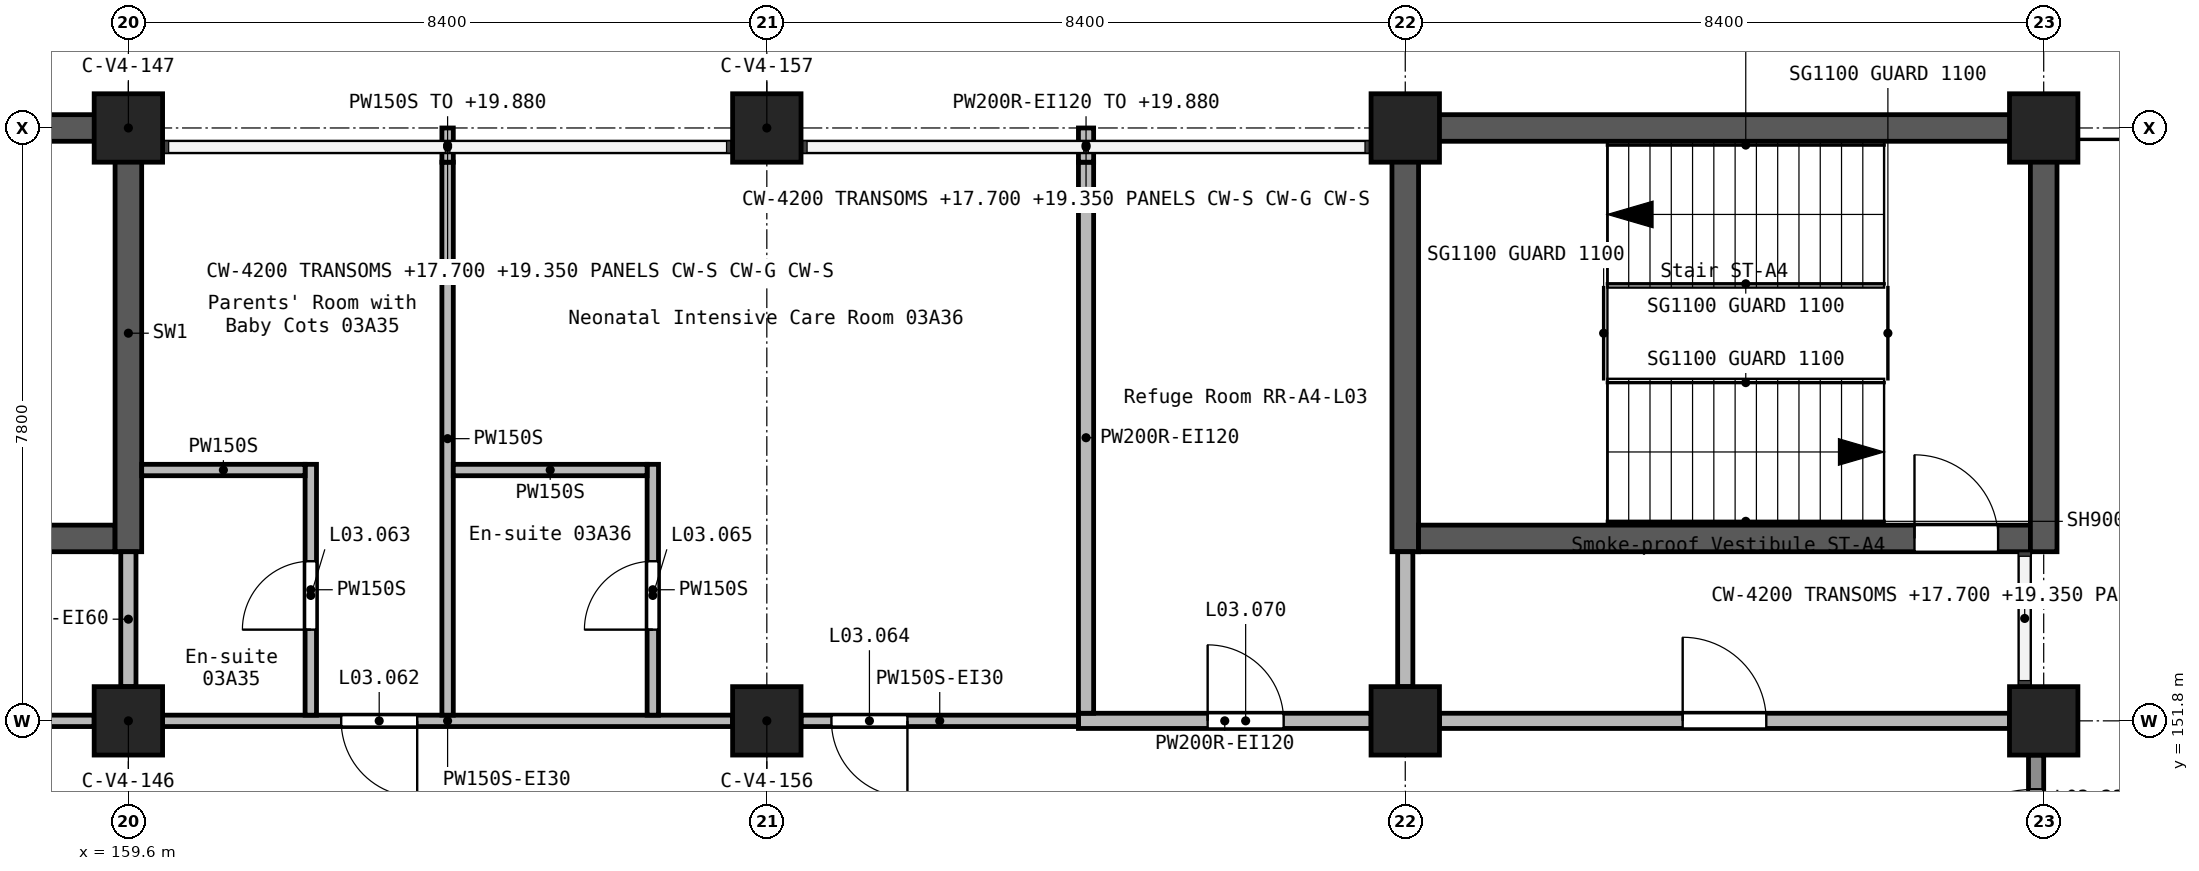
"""IFC4 building model, lengths in metres.
Left out: names, types, materials, properties, quantities, classifications, styles, units other than length and angle.
Written with IfcOpenShell. Run it as: python <this file> out.ifc"""

import sys

from ifc_helpers import new_model, si_unit, direction, frame, frame_2d, origin, origin_2d, place, context, subcontext, project, spatial, rectangle, extrude, element, fill, save


model = new_model("IFC4")
c1 = context("Model", 3, precision=1e-05, world=origin(), true_north=direction((0.0, 1.0)))
c2 = subcontext(c1, "Body", "Model", "MODEL_VIEW")
j1 = project(units=[si_unit("LENGTHUNIT", "METRE"), si_unit("PLANEANGLEUNIT", "RADIAN")], contexts=[c1])
p1 = place(None, origin())
s1 = spatial("IfcSite", under=j1, at=p1, CompositionType="ELEMENT")
p2 = place(p1, origin())
s2 = spatial("IfcBuilding", under=s1, at=p2, CompositionType="ELEMENT")
p3 = place(p2, frame((0.0, 0.0, 16.8)))
s3 = spatial("IfcBuildingStorey", under=s2, at=p3, CompositionType="ELEMENT", Elevation=16.8)
for number, where, z_axis, x_axis in (
    (1, (159.6, 151.8, 0.0), (0.0, 0.0, 1.0), (1.0, 0.0, 0.0)),
    (2, (159.6, 159.6, 0.0), (0.0, 0.0, 1.0), (1.0, 0.0, 0.0)),
    (3, (168.0, 151.8, 0.0), (0.0, 0.0, 1.0), (1.0, 0.0, 0.0)),
    (4, (168.0, 159.6, 0.0), (0.0, 0.0, 1.0), (1.0, 0.0, 0.0)),
    (5, (176.4, 151.8, 0.0), (0.0, 0.0, 1.0), (1.0, 0.0, 0.0)),
    (6, (176.4, 159.6, 0.0), (0.0, 0.0, 1.0), (1.0, 0.0, 0.0)),
    (7, (184.8, 151.8, 0.0), (0.0, 0.0, 1.0), (1.0, 0.0, 0.0)),
    (8, (184.8, 159.6, 0.0), (0.0, 0.0, 1.0), (1.0, 0.0, 0.0)),
):
    element("IfcColumn", number, at=place(p3, frame(where, z_axis=z_axis, x_axis=x_axis)), inside=s3, PredefinedType="COLUMN", context=c2, shape_type="SweptSolid", body=[
        extrude(rectangle(XDim=0.9, YDim=0.9, at=origin_2d()), origin(), (0.0, 0.0, 1.0), 4.2),
    ])
p4 = place(p3, frame((176.225, 159.6, 0.0), z_axis=(0.0, 0.0, 1.0), x_axis=(1.0, 0.0, 0.0)))
e9 = element("IfcWall", 9, at=p4, inside=s3, PredefinedType="SHEAR", context=c2, shape_type="SweptSolid", body=[
    extrude(rectangle(XDim=8.4, YDim=0.35, at=frame_2d((4.2, 0.0))), origin(), (0.0, 0.0, 1.0), 4.2),
])
p5 = place(p3, frame((176.4, 154.025, 0.0), z_axis=(0.0, 0.0, 1.0), x_axis=(0.0, 1.0, 0.0)))
e10 = element("IfcWall", 10, at=p5, inside=s3, PredefinedType="SHEAR", context=c2, shape_type="SweptSolid", body=[
    extrude(rectangle(XDim=5.4, YDim=0.35, at=frame_2d((2.7, 0.0))), origin(), (0.0, 0.0, 1.0), 4.2),
])
p6 = place(p3, frame((176.575, 154.2, 0.0), z_axis=(0.0, 0.0, 1.0), x_axis=(1.0, 0.0, 0.0)))
e11 = element("IfcWall", 11, at=p6, inside=s3, PredefinedType="SHEAR", context=c2, shape_type="SweptSolid", body=[
    extrude(rectangle(XDim=8.05, YDim=0.35, at=frame_2d((4.025, 0.0))), origin(), (0.0, 0.0, 1.0), 4.2),
])
p7 = place(p6, frame((6.525, 0.0, 0.0)))
e12 = element("IfcOpeningElement", 12, at=p7, cuts=e11, PredefinedType="OPENING", context=c2, shape_type="SweptSolid", body=[
    extrude(rectangle(XDim=1.1, YDim=2.1, at=frame_2d((0.55, 1.05))), frame((0.0, 0.185, 0.0), z_axis=(0.0, -1.0, 0.0), x_axis=(1.0, 0.0, 0.0)), (0.0, 0.0, 1.0), 0.37),
])
p8 = place(p3, frame((184.8, 154.025, 0.0), z_axis=(0.0, 0.0, 1.0), x_axis=(0.0, 1.0, 0.0)))
e13 = element("IfcWall", 13, at=p8, inside=s3, PredefinedType="SHEAR", context=c2, shape_type="SweptSolid", body=[
    extrude(rectangle(XDim=5.75, YDim=0.35, at=frame_2d((2.875, 0.0))), origin(), (0.0, 0.0, 1.0), 4.2),
])
for number, where, z_axis, x_axis in (
    (14, (155.4, 154.2, 0.0), (0.0, 0.0, 1.0), (1.0, 0.0, 0.0)),
    (15, (155.4, 159.6, 0.0), (0.0, 0.0, 1.0), (1.0, 0.0, 0.0)),
):
    element("IfcWall", number, at=place(p3, frame(where, z_axis=z_axis, x_axis=x_axis)), inside=s3, PredefinedType="SHEAR", context=c2, shape_type="SweptSolid", body=[
        extrude(rectangle(XDim=4.025, YDim=0.35, at=frame_2d((2.013, 0.0))), origin(), (0.0, 0.0, 1.0), 3.9),
    ])
p9 = place(p3, frame((159.6, 154.025, 0.0), z_axis=(0.0, 0.0, 1.0), x_axis=(0.0, 1.0, 0.0)))
e16 = element("IfcWall", 16, at=p9, inside=s3, PredefinedType="SHEAR", context=c2, shape_type="SweptSolid", body=[
    extrude(rectangle(XDim=5.75, YDim=0.35, at=frame_2d((2.875, 0.0))), origin(), (0.0, 0.0, 1.0), 3.9),
])
p10 = place(p3, frame((184.7, 148.65, 0.0), z_axis=(0.0, 0.0, 1.0), x_axis=(0.0, 1.0, 0.0)))
e17 = element("IfcWall", 17, at=p10, inside=s3, PredefinedType="STANDARD", context=c2, shape_type="SweptSolid", body=[
    extrude(rectangle(XDim=2.7, YDim=0.2, at=frame_2d((1.35, 0.0))), origin(), (0.0, 0.0, 1.0), 3.05),
])
p11 = place(p10, frame((0.45, 0.0, 0.0)))
e18 = element("IfcOpeningElement", 18, at=p11, cuts=e17, PredefinedType="OPENING", context=c2, shape_type="SweptSolid", body=[
    extrude(rectangle(XDim=1.8, YDim=2.4, at=frame_2d((0.9, 1.2))), frame((0.0, 0.11, 0.0), z_axis=(0.0, -1.0, 0.0), x_axis=(1.0, 0.0, 0.0)), (0.0, 0.0, 1.0), 0.22),
])
p12 = place(p3, frame((172.1, 151.8, 0.0), z_axis=(0.0, 0.0, 1.0), x_axis=(1.0, 0.0, 0.0)))
e19 = element("IfcWall", 19, at=p12, inside=s3, PredefinedType="SOLIDWALL", context=c2, shape_type="SweptSolid", body=[
    extrude(rectangle(XDim=3.85, YDim=0.2, at=frame_2d((1.925, 0.0))), origin(), (0.0, 0.0, 1.0), 3.9),
])
p13 = place(p12, frame((1.7, 0.0, 0.0)))
e20 = element("IfcOpeningElement", 20, at=p13, cuts=e19, PredefinedType="OPENING", context=c2, shape_type="SweptSolid", body=[
    extrude(rectangle(XDim=1.0, YDim=2.1, at=frame_2d((0.5, 1.05))), frame((0.0, 0.11, 0.0), z_axis=(0.0, -1.0, 0.0), x_axis=(1.0, 0.0, 0.0)), (0.0, 0.0, 1.0), 0.22),
])
p14 = place(p3, frame((176.85, 151.8, 0.0), z_axis=(0.0, 0.0, 1.0), x_axis=(1.0, 0.0, 0.0)))
e21 = element("IfcWall", 21, at=p14, inside=s3, PredefinedType="SOLIDWALL", context=c2, shape_type="SweptSolid", body=[
    extrude(rectangle(XDim=7.5, YDim=0.2, at=frame_2d((3.75, 0.0))), origin(), (0.0, 0.0, 1.0), 3.9),
])
p15 = place(p14, frame((3.2, 0.0, 0.0)))
e22 = element("IfcOpeningElement", 22, at=p15, cuts=e21, PredefinedType="OPENING", context=c2, shape_type="SweptSolid", body=[
    extrude(rectangle(XDim=1.1, YDim=2.1, at=frame_2d((0.55, 1.05))), frame((0.0, 0.11, 0.0), z_axis=(0.0, -1.0, 0.0), x_axis=(1.0, 0.0, 0.0)), (0.0, 0.0, 1.0), 0.22),
])
p16 = place(p3, frame((176.4, 152.25, 0.0), z_axis=(0.0, 0.0, 1.0), x_axis=(0.0, 1.0, 0.0)))
e23 = element("IfcWall", 23, at=p16, inside=s3, PredefinedType="SOLIDWALL", context=c2, shape_type="SweptSolid", body=[
    extrude(rectangle(XDim=1.775, YDim=0.2, at=frame_2d((0.887, 0.0))), origin(), (0.0, 0.0, 1.0), 3.9),
])
p17 = place(p3, frame((172.2, 151.9, 0.0), z_axis=(0.0, 0.0, 1.0), x_axis=(0.0, 1.0, 0.0)))
e24 = element("IfcWall", 24, at=p17, inside=s3, PredefinedType="SOLIDWALL", context=c2, shape_type="SweptSolid", body=[
    extrude(rectangle(XDim=7.25, YDim=0.2, at=frame_2d((3.625, 0.0))), origin(), (0.0, 0.0, 1.0), 3.9),
])
p18 = place(p3, frame((172.2, 159.15, 0.0), z_axis=(0.0, 0.0, 1.0), x_axis=(0.0, 1.0, 0.0)))
e25 = element("IfcWall", 25, at=p18, inside=s3, PredefinedType="SOLIDWALL", context=c2, shape_type="SweptSolid", body=[
    extrude(rectangle(XDim=0.45, YDim=0.2, at=frame_2d((0.225, 0.0))), origin(), (0.0, 0.0, 1.0), 3.08),
])
p19 = place(p3, frame((159.6, 152.25, 0.0), z_axis=(0.0, 0.0, 1.0), x_axis=(0.0, 1.0, 0.0)))
e26 = element("IfcWall", 26, at=p19, inside=s3, PredefinedType="SOLIDWALL", context=c2, shape_type="SweptSolid", body=[
    extrude(rectangle(XDim=1.775, YDim=0.2, at=frame_2d((0.887, 0.0))), origin(), (0.0, 0.0, 1.0), 3.9),
])
p20 = place(p3, frame((172.1, 151.8, 0.0), z_axis=(0.0, 0.0, 1.0), x_axis=(-1.0, 0.0, 0.0)))
e27 = element("IfcWall", 27, at=p20, inside=s3, PredefinedType="PARTITIONING", context=c2, shape_type="SweptSolid", body=[
    extrude(rectangle(XDim=3.65, YDim=0.15, at=frame_2d((1.825, 0.0))), origin(), (0.0, 0.0, 1.0), 3.9),
])
p21 = place(p20, frame((2.25, 0.0, 0.0)))
e28 = element("IfcOpeningElement", 28, at=p21, cuts=e27, PredefinedType="OPENING", context=c2, shape_type="SweptSolid", body=[
    extrude(rectangle(XDim=1.0, YDim=2.1, at=frame_2d((0.5, 1.05))), frame((0.0, 0.085, 0.0), z_axis=(0.0, -1.0, 0.0), x_axis=(1.0, 0.0, 0.0)), (0.0, 0.0, 1.0), 0.17),
])
p22 = place(p3, frame((167.55, 151.8, 0.0), z_axis=(0.0, 0.0, 1.0), x_axis=(-1.0, 0.0, 0.0)))
e29 = element("IfcWall", 29, at=p22, inside=s3, PredefinedType="PARTITIONING", context=c2, shape_type="SweptSolid", body=[
    extrude(rectangle(XDim=7.5, YDim=0.15, at=frame_2d((3.75, 0.0))), origin(), (0.0, 0.0, 1.0), 3.9),
])
p23 = place(p22, frame((4.15, 0.0, 0.0)))
e30 = element("IfcOpeningElement", 30, at=p23, cuts=e29, PredefinedType="OPENING", context=c2, shape_type="SweptSolid", body=[
    extrude(rectangle(XDim=1.0, YDim=2.1, at=frame_2d((0.5, 1.05))), frame((0.0, 0.085, 0.0), z_axis=(0.0, -1.0, 0.0), x_axis=(1.0, 0.0, 0.0)), (0.0, 0.0, 1.0), 0.17),
])
p24 = place(p3, frame((151.65, 151.8, 0.0), z_axis=(0.0, 0.0, 1.0), x_axis=(1.0, 0.0, 0.0)))
e31 = element("IfcWall", 31, at=p24, inside=s3, PredefinedType="PARTITIONING", context=c2, shape_type="SweptSolid", body=[
    extrude(rectangle(XDim=7.5, YDim=0.15, at=frame_2d((3.75, 0.0))), origin(), (0.0, 0.0, 1.0), 3.9),
])
p25 = place(p24, frame((3.25, 0.0, 0.0)))
e32 = element("IfcOpeningElement", 32, at=p25, cuts=e31, PredefinedType="OPENING", context=c2, shape_type="SweptSolid", body=[
    extrude(rectangle(XDim=1.0, YDim=2.1, at=frame_2d((0.5, 1.05))), frame((0.0, 0.085, 0.0), z_axis=(0.0, -1.0, 0.0), x_axis=(1.0, 0.0, 0.0)), (0.0, 0.0, 1.0), 0.17),
])
p26 = place(p3, frame((163.8, 151.875, 0.0), z_axis=(0.0, 0.0, 1.0), x_axis=(0.0, 1.0, 0.0)))
e33 = element("IfcWall", 33, at=p26, inside=s3, PredefinedType="PARTITIONING", context=c2, shape_type="SweptSolid", body=[
    extrude(rectangle(XDim=7.275, YDim=0.15, at=frame_2d((3.637, 0.0))), origin(), (0.0, 0.0, 1.0), 3.9),
])
p27 = place(p3, frame((163.8, 159.15, 0.0), z_axis=(0.0, 0.0, 1.0), x_axis=(0.0, 1.0, 0.0)))
e34 = element("IfcWall", 34, at=p27, inside=s3, PredefinedType="PARTITIONING", context=c2, shape_type="SweptSolid", body=[
    extrude(rectangle(XDim=0.45, YDim=0.15, at=frame_2d((0.225, 0.0))), origin(), (0.0, 0.0, 1.0), 3.08),
])
p28 = place(p3, frame((162.0, 151.875, 0.0), z_axis=(0.0, 0.0, 1.0), x_axis=(0.0, 1.0, 0.0)))
e35 = element("IfcWall", 35, at=p28, inside=s3, PredefinedType="PARTITIONING", context=c2, shape_type="SweptSolid", body=[
    extrude(rectangle(XDim=3.3, YDim=0.15, at=frame_2d((1.65, 0.0))), origin(), (0.0, 0.0, 1.0), 3.9),
])
p29 = place(p28, frame((1.125, 0.0, 0.0)))
e36 = element("IfcOpeningElement", 36, at=p29, cuts=e35, PredefinedType="OPENING", context=c2, shape_type="SweptSolid", body=[
    extrude(rectangle(XDim=0.9, YDim=2.1, at=frame_2d((0.45, 1.05))), frame((0.0, 0.085, 0.0), z_axis=(0.0, -1.0, 0.0), x_axis=(1.0, 0.0, 0.0)), (0.0, 0.0, 1.0), 0.17),
])
p30 = place(p3, frame((166.5, 151.875, 0.0), z_axis=(0.0, 0.0, 1.0), x_axis=(0.0, 1.0, 0.0)))
e37 = element("IfcWall", 37, at=p30, inside=s3, PredefinedType="PARTITIONING", context=c2, shape_type="SweptSolid", body=[
    extrude(rectangle(XDim=3.3, YDim=0.15, at=frame_2d((1.65, 0.0))), origin(), (0.0, 0.0, 1.0), 3.9),
])
p31 = place(p30, frame((1.125, 0.0, 0.0)))
e38 = element("IfcOpeningElement", 38, at=p31, cuts=e37, PredefinedType="OPENING", context=c2, shape_type="SweptSolid", body=[
    extrude(rectangle(XDim=0.9, YDim=2.1, at=frame_2d((0.45, 1.05))), frame((0.0, 0.085, 0.0), z_axis=(0.0, -1.0, 0.0), x_axis=(1.0, 0.0, 0.0)), (0.0, 0.0, 1.0), 0.17),
])
p32 = place(p3, frame((163.875, 155.1, 0.0), z_axis=(0.0, 0.0, 1.0), x_axis=(1.0, 0.0, 0.0)))
e39 = element("IfcWall", 39, at=p32, inside=s3, PredefinedType="PARTITIONING", context=c2, shape_type="SweptSolid", body=[
    extrude(rectangle(XDim=2.55, YDim=0.15, at=frame_2d((1.275, 0.0))), origin(), (0.0, 0.0, 1.0), 3.9),
])
p33 = place(p3, frame((159.775, 155.1, 0.0), z_axis=(0.0, 0.0, 1.0), x_axis=(1.0, 0.0, 0.0)))
e40 = element("IfcWall", 40, at=p33, inside=s3, PredefinedType="PARTITIONING", context=c2, shape_type="SweptSolid", body=[
    extrude(rectangle(XDim=2.15, YDim=0.15, at=frame_2d((1.075, 0.0))), origin(), (0.0, 0.0, 1.0), 3.9),
])
p34 = place(p11, frame((1.8, 0.0, 0.0), z_axis=(0.0, 0.0, 1.0), x_axis=(-1.0, 0.0, 0.0)))
e41 = element("IfcDoor", 41, at=p34, inside=s3, OperationType="SINGLE_SWING_LEFT", PredefinedType="DOOR", context=c2, shape_type="SweptSolid", body=[
    extrude(rectangle(XDim=1.8, YDim=2.4, at=frame_2d((0.9, 1.2))), frame((0.0, 0.025, 0.0), z_axis=(0.0, -1.0, 0.0), x_axis=(1.0, 0.0, 0.0)), (0.0, 0.0, 1.0), 0.05),
])
fill(e18, e41)
p35 = place(p23, frame((1.0, 0.0, 0.0), z_axis=(0.0, 0.0, 1.0), x_axis=(-1.0, 0.0, 0.0)))
e42 = element("IfcDoor", 42, at=p35, inside=s3, OperationType="SINGLE_SWING_LEFT", PredefinedType="DOOR", context=c2, shape_type="SweptSolid", body=[
    extrude(rectangle(XDim=1.0, YDim=2.1, at=frame_2d((0.5, 1.05))), frame((0.0, 0.025, 0.0), z_axis=(0.0, -1.0, 0.0), x_axis=(1.0, 0.0, 0.0)), (0.0, 0.0, 1.0), 0.05),
])
fill(e30, e42)
p36 = place(p29, origin())
e43 = element("IfcDoor", 43, at=p36, inside=s3, OperationType="SINGLE_SWING_LEFT", PredefinedType="DOOR", context=c2, shape_type="SweptSolid", body=[
    extrude(rectangle(XDim=0.9, YDim=2.1, at=frame_2d((0.45, 1.05))), frame((0.0, 0.025, 0.0), z_axis=(0.0, -1.0, 0.0), x_axis=(1.0, 0.0, 0.0)), (0.0, 0.0, 1.0), 0.05),
])
fill(e36, e43)
p37 = place(p21, frame((1.0, 0.0, 0.0), z_axis=(0.0, 0.0, 1.0), x_axis=(-1.0, 0.0, 0.0)))
e44 = element("IfcDoor", 44, at=p37, inside=s3, OperationType="SINGLE_SWING_LEFT", PredefinedType="DOOR", context=c2, shape_type="SweptSolid", body=[
    extrude(rectangle(XDim=1.0, YDim=2.1, at=frame_2d((0.5, 1.05))), frame((0.0, 0.025, 0.0), z_axis=(0.0, -1.0, 0.0), x_axis=(1.0, 0.0, 0.0)), (0.0, 0.0, 1.0), 0.05),
])
fill(e28, e44)
p38 = place(p31, origin())
e45 = element("IfcDoor", 45, at=p38, inside=s3, OperationType="SINGLE_SWING_LEFT", PredefinedType="DOOR", context=c2, shape_type="SweptSolid", body=[
    extrude(rectangle(XDim=0.9, YDim=2.1, at=frame_2d((0.45, 1.05))), frame((0.0, 0.025, 0.0), z_axis=(0.0, -1.0, 0.0), x_axis=(1.0, 0.0, 0.0)), (0.0, 0.0, 1.0), 0.05),
])
fill(e38, e45)
p39 = place(p13, origin())
e46 = element("IfcDoor", 46, at=p39, inside=s3, OperationType="SINGLE_SWING_RIGHT", PredefinedType="DOOR", context=c2, shape_type="SweptSolid", body=[
    extrude(rectangle(XDim=1.0, YDim=2.1, at=frame_2d((0.5, 1.05))), frame((0.0, 0.025, 0.0), z_axis=(0.0, -1.0, 0.0), x_axis=(1.0, 0.0, 0.0)), (0.0, 0.0, 1.0), 0.05),
])
fill(e20, e46)
p40 = place(p7, origin())
e47 = element("IfcDoor", 47, at=p40, inside=s3, OperationType="SINGLE_SWING_RIGHT", PredefinedType="DOOR", context=c2, shape_type="SweptSolid", body=[
    extrude(rectangle(XDim=1.1, YDim=2.1, at=frame_2d((0.55, 1.05))), frame((0.0, 0.025, 0.0), z_axis=(0.0, -1.0, 0.0), x_axis=(1.0, 0.0, 0.0)), (0.0, 0.0, 1.0), 0.05),
])
fill(e12, e47)
p41 = place(p15, origin())
e48 = element("IfcDoor", 48, at=p41, inside=s3, OperationType="SINGLE_SWING_RIGHT", PredefinedType="DOOR", context=c2, shape_type="SweptSolid", body=[
    extrude(rectangle(XDim=1.1, YDim=2.1, at=frame_2d((0.55, 1.05))), frame((0.0, 0.025, 0.0), z_axis=(0.0, -1.0, 0.0), x_axis=(1.0, 0.0, 0.0)), (0.0, 0.0, 1.0), 0.05),
])
fill(e22, e48)
save(model, sys.argv[1])
